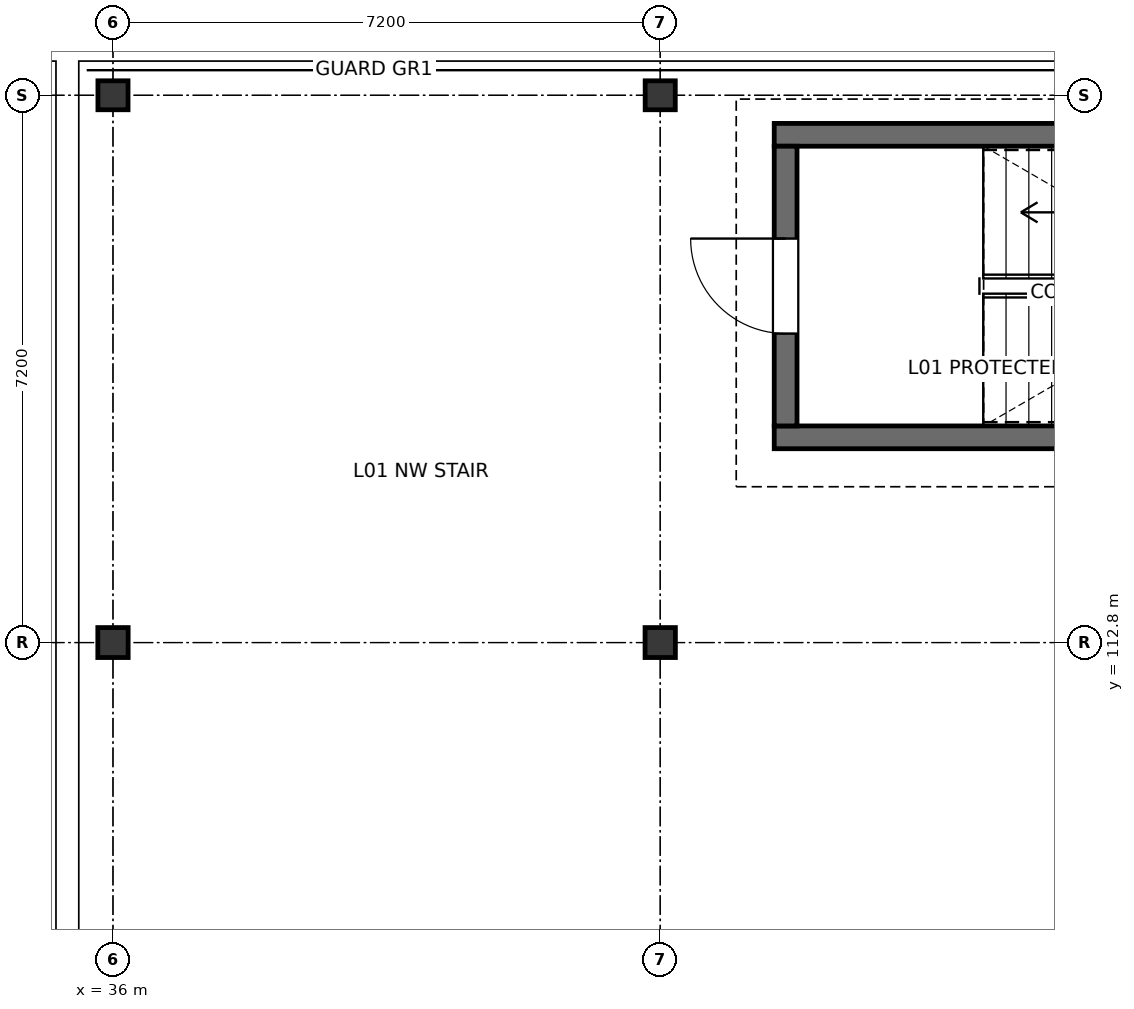
"""IFC4 building model, lengths in metres.
Left out: names, types, materials, properties, quantities, classifications, styles, units other than length and angle.
Written with IfcOpenShell. Run it as: python <this file> out.ifc"""

import sys

from ifc_helpers import new_model, si_unit, direction, frame, frame_2d, origin, origin_2d, place, context, subcontext, project, spatial, rectangle, i_section, extrude, element, fill, save


model = new_model("IFC4")
c1 = context("Model", 3, precision=1e-05, world=origin(), true_north=direction((0.0, 1.0)))
c2 = subcontext(c1, "Body", "Model", "MODEL_VIEW")
j1 = project(units=[si_unit("LENGTHUNIT", "METRE"), si_unit("PLANEANGLEUNIT", "RADIAN")], contexts=[c1])
p1 = place(None, origin())
s1 = spatial("IfcSite", under=j1, at=p1, CompositionType="ELEMENT")
p2 = place(p1, origin())
s2 = spatial("IfcBuilding", under=s1, at=p2, CompositionType="ELEMENT")
p3 = place(p2, frame((0.0, 0.0, 5.4)))
s3 = spatial("IfcBuildingStorey", under=s2, at=p3, CompositionType="ELEMENT", Elevation=5.4)
p4 = place(p3, frame((36.0, 112.8, 0.0), z_axis=(0.0, 0.0, 1.0), x_axis=(1.0, 0.0, 0.0)))
e1 = element("IfcColumn", 1, at=p4, inside=s3, PredefinedType="COLUMN", context=c2, shape_type="SweptSolid", body=[
    extrude(i_section(OverallWidth=0.399, OverallDepth=0.394, WebThickness=0.023, FlangeThickness=0.037, FilletRadius=0.015, at=origin_2d()), origin(), (0.0, 0.0, 1.0), 3.9),
])
p5 = place(p3, frame((36.0, 120.0, 0.0), z_axis=(0.0, 0.0, 1.0), x_axis=(1.0, 0.0, 0.0)))
e2 = element("IfcColumn", 2, at=p5, inside=s3, PredefinedType="COLUMN", context=c2, shape_type="SweptSolid", body=[
    extrude(i_section(OverallWidth=0.396, OverallDepth=0.381, WebThickness=0.019, FlangeThickness=0.03, FilletRadius=0.015, at=origin_2d()), origin(), (0.0, 0.0, 1.0), 3.9),
])
p6 = place(p3, frame((43.2, 112.8, 0.0), z_axis=(0.0, 0.0, 1.0), x_axis=(1.0, 0.0, 0.0)))
e3 = element("IfcColumn", 3, at=p6, inside=s3, PredefinedType="COLUMN", context=c2, shape_type="SweptSolid", body=[
    extrude(i_section(OverallWidth=0.399, OverallDepth=0.394, WebThickness=0.023, FlangeThickness=0.037, FilletRadius=0.015, at=origin_2d()), origin(), (0.0, 0.0, 1.0), 3.9),
])
p7 = place(p3, frame((43.2, 120.0, 0.0), z_axis=(0.0, 0.0, 1.0), x_axis=(1.0, 0.0, 0.0)))
e4 = element("IfcColumn", 4, at=p7, inside=s3, PredefinedType="COLUMN", context=c2, shape_type="SweptSolid", body=[
    extrude(i_section(OverallWidth=0.396, OverallDepth=0.381, WebThickness=0.019, FlangeThickness=0.03, FilletRadius=0.015, at=origin_2d()), origin(), (0.0, 0.0, 1.0), 3.9),
])
for number, where, z_axis, x_axis in (
    (5, (54.1, 115.5, 0.0), (0.0, 0.0, 1.0), (-1.0, 0.0, 0.0)),
    (6, (44.7, 119.48, 0.0), (0.0, 0.0, 1.0), (1.0, 0.0, 0.0)),
):
    element("IfcWall", number, at=place(p3, frame(where, z_axis=z_axis, x_axis=x_axis)), inside=s3, PredefinedType="SOLIDWALL", context=c2, shape_type="SweptSolid", body=[
        extrude(rectangle(XDim=9.4, YDim=0.3, at=frame_2d((4.7, 0.0))), origin(), (0.0, 0.0, 1.0), 3.67),
    ])
p8 = place(p3, frame((44.85, 115.65, 0.0), z_axis=(0.0, 0.0, 1.0), x_axis=(0.0, 1.0, 0.0)))
e7 = element("IfcWall", 7, at=p8, inside=s3, PredefinedType="SOLIDWALL", context=c2, shape_type="SweptSolid", body=[
    extrude(rectangle(XDim=3.68, YDim=0.3, at=frame_2d((1.84, 0.0))), origin(), (0.0, 0.0, 1.0), 3.67),
])
p9 = place(p8, frame((1.215, 0.0, 0.0)))
e8 = element("IfcOpeningElement", 8, at=p9, cuts=e7, PredefinedType="OPENING", context=c2, shape_type="SweptSolid", body=[
    extrude(rectangle(XDim=1.25, YDim=2.2, at=frame_2d((0.625, 1.1))), frame((0.0, 0.16, 0.0), z_axis=(0.0, -1.0, 0.0), x_axis=(1.0, 0.0, 0.0)), (0.0, 0.0, 1.0), 0.32),
])
p10 = place(p9, origin())
e9 = element("IfcDoor", 9, at=p10, inside=s3, OperationType="SINGLE_SWING_RIGHT", PredefinedType="DOOR", context=c2, shape_type="SweptSolid", body=[
    extrude(rectangle(XDim=1.25, YDim=2.2, at=frame_2d((0.625, 1.1))), frame((0.0, 0.025, 0.0), z_axis=(0.0, -1.0, 0.0), x_axis=(1.0, 0.0, 0.0)), (0.0, 0.0, 1.0), 0.05),
])
fill(e8, e9)
save(model, sys.argv[1])
